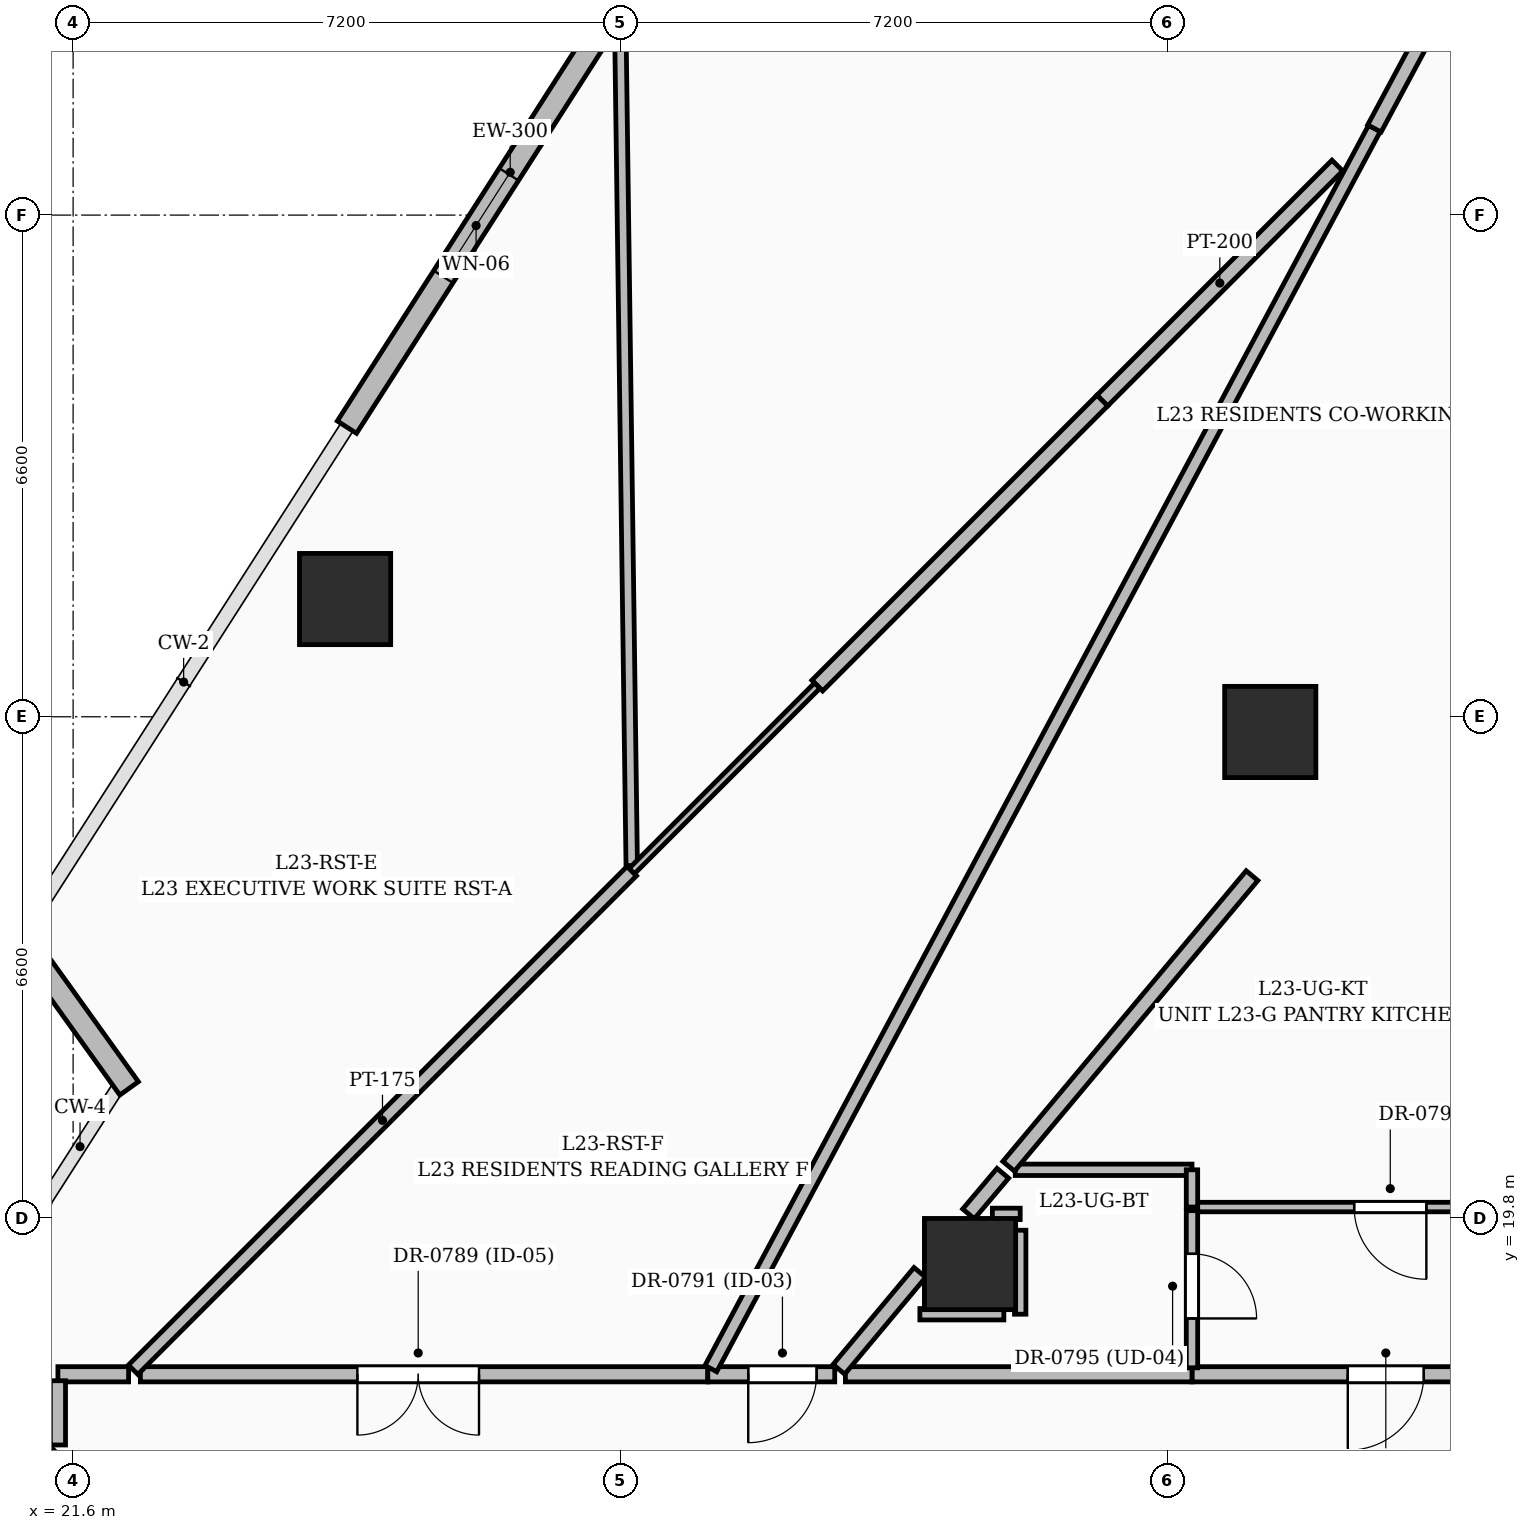
"""IFC4 building model, lengths in metres.
Left out: names, types, materials, properties, quantities, classifications, styles, units other than length and angle.
Written with IfcOpenShell. Run it as: python <this file> out.ifc"""

import sys

from ifc_helpers import new_model, si_unit, direction, frame, frame_2d, origin, origin_2d, place, context, subcontext, project, spatial, rectangle, extrude, element, fill, save


model = new_model("IFC4")
c1 = context("Model", 3, precision=1e-05, world=origin(), true_north=direction((0.0, 1.0)))
c2 = subcontext(c1, "Body", "Model", "MODEL_VIEW")
j1 = project(units=[si_unit("LENGTHUNIT", "METRE"), si_unit("PLANEANGLEUNIT", "RADIAN")], contexts=[c1])
p1 = place(None, origin())
s1 = spatial("IfcSite", under=j1, at=p1, CompositionType="ELEMENT")
p2 = place(p1, origin())
s2 = spatial("IfcBuilding", under=s1, at=p2, CompositionType="ELEMENT")
p3 = place(p2, frame((0.0, 0.0, 93.0)))
s3 = spatial("IfcBuildingStorey", under=s2, at=p3, CompositionType="ELEMENT", Elevation=93.0)
for number, where, z_axis, x_axis in (
    (1, (37.35, 26.2, 0.0), (0.0, 0.0, 1.0), (1.0, 0.0, 0.0)),
    (2, (33.4, 19.2, 0.0), (0.0, 0.0, 1.0), (1.0, 0.0, 0.0)),
    (3, (25.178, 27.949, 0.0), (0.0, 0.0, 1.0), (1.0, 0.0, 0.0)),
):
    element("IfcColumn", number, at=place(p3, frame(where, z_axis=z_axis, x_axis=x_axis)), inside=s3, PredefinedType="COLUMN", context=c2, shape_type="SweptSolid", body=[
        extrude(rectangle(XDim=1.2, YDim=1.2, at=origin_2d()), origin(), (0.0, 0.0, 1.0), 3.6),
    ])
p4 = place(p3, frame((22.337, 21.511, 0.0), z_axis=(0.0, 0.0, 1.0), x_axis=(-0.583178108206, 0.812344319922, 0.0)))
e4 = element("IfcWall", 4, at=p4, inside=s3, PredefinedType="SOLIDWALL", context=c2, shape_type="SweptSolid", body=[
    extrude(rectangle(XDim=2.593, YDim=0.3, at=frame_2d((1.296, 0.0))), origin(), (0.0, 0.0, 1.0), 2.375),
])
p5 = place(p3, frame((25.202, 30.21, 0.0), z_axis=(0.0, 0.0, 1.0), x_axis=(0.53945551692, 0.842014100395, 0.0)))
e5 = element("IfcWall", 5, at=p5, inside=s3, PredefinedType="SOLIDWALL", context=c2, shape_type="SweptSolid", body=[
    extrude(rectangle(XDim=7.964, YDim=0.3, at=frame_2d((3.982, 0.0))), origin(), (0.0, 0.0, 1.0), 3.35),
])
p6 = place(p5, frame((2.35, 0.0, 0.55)))
e6 = element("IfcOpeningElement", 6, at=p6, cuts=e5, PredefinedType="OPENING", context=c2, shape_type="SweptSolid", body=[
    extrude(rectangle(XDim=1.6, YDim=2.2, at=frame_2d((0.8, 1.1))), frame((0.0, 0.16, 0.0), z_axis=(0.0, -1.0, 0.0), x_axis=(1.0, 0.0, 0.0)), (0.0, 0.0, 1.0), 0.32),
])
p7 = place(p3, frame((22.33, 17.75, 0.0), z_axis=(0.0, 0.0, 1.0), x_axis=(-1.0, 0.0, 0.0)))
e7 = element("IfcWall", 7, at=p7, inside=s3, PredefinedType="PARTITIONING", context=c2, shape_type="SweptSolid", body=[
    extrude(rectangle(XDim=0.93, YDim=0.2, at=frame_2d((0.465, 0.0))), origin(), (0.0, 0.0, 1.0), 2.787),
])
p8 = place(p3, frame((21.4, 17.665, 0.0), z_axis=(0.0, 0.0, 1.0), x_axis=(0.0, -1.0, 0.0)))
e8 = element("IfcWall", 8, at=p8, inside=s3, PredefinedType="PARTITIONING", context=c2, shape_type="SweptSolid", body=[
    extrude(rectangle(XDim=0.845, YDim=0.2, at=frame_2d((0.422, 0.0))), origin(), (0.0, 0.0, 1.0), 2.787),
])
p9 = place(p3, frame((29.95, 17.75, 0.0), z_axis=(0.0, 0.0, 1.0), x_axis=(-1.0, 0.0, 0.0)))
e9 = element("IfcWall", 9, at=p9, inside=s3, PredefinedType="PARTITIONING", context=c2, shape_type="SweptSolid", body=[
    extrude(rectangle(XDim=7.465, YDim=0.2, at=frame_2d((3.732, 0.0))), origin(), (0.0, 0.0, 1.0), 2.345),
])
p10 = place(p9, frame((3.01, 0.0, 0.0)))
e10 = element("IfcOpeningElement", 10, at=p10, cuts=e9, PredefinedType="OPENING", context=c2, shape_type="SweptSolid", body=[
    extrude(rectangle(XDim=1.6, YDim=2.3, at=frame_2d((0.8, 1.15))), frame((0.0, 0.11, 0.0), z_axis=(0.0, -1.0, 0.0), x_axis=(1.0, 0.0, 0.0)), (0.0, 0.0, 1.0), 0.22),
])
p11 = place(p3, frame((41.42, 17.75, 0.0), z_axis=(0.0, 0.0, 1.0), x_axis=(-1.0, 0.0, 0.0)))
e11 = element("IfcWall", 11, at=p11, inside=s3, PredefinedType="PARTITIONING", context=c2, shape_type="SweptSolid", body=[
    extrude(rectangle(XDim=5.1, YDim=0.2, at=frame_2d((2.55, 0.0))), origin(), (0.0, 0.0, 1.0), 3.35),
])
p12 = place(p11, frame((2.05, 0.0, 0.0)))
e12 = element("IfcOpeningElement", 12, at=p12, cuts=e11, PredefinedType="OPENING", context=c2, shape_type="SweptSolid", body=[
    extrude(rectangle(XDim=1.0, YDim=2.2, at=frame_2d((0.5, 1.1))), frame((0.0, 0.11, 0.0), z_axis=(0.0, -1.0, 0.0), x_axis=(1.0, 0.0, 0.0)), (0.0, 0.0, 1.0), 0.22),
])
p13 = place(p3, frame((36.32, 17.75, 0.0), z_axis=(0.0, 0.0, 1.0), x_axis=(-1.0, 0.0, 0.0)))
e13 = element("IfcWall", 13, at=p13, inside=s3, PredefinedType="PARTITIONING", context=c2, shape_type="SweptSolid", body=[
    extrude(rectangle(XDim=4.56, YDim=0.2, at=frame_2d((2.28, 0.0))), origin(), (0.0, 0.0, 1.0), 2.309),
])
p14 = place(p3, frame((31.62, 17.75, 0.0), z_axis=(0.0, 0.0, 1.0), x_axis=(-1.0, 0.0, 0.0)))
e14 = element("IfcWall", 14, at=p14, inside=s3, PredefinedType="PARTITIONING", context=c2, shape_type="SweptSolid", body=[
    extrude(rectangle(XDim=1.67, YDim=0.2, at=frame_2d((0.835, 0.0))), origin(), (0.0, 0.0, 1.0), 3.35),
])
p15 = place(p14, frame((0.238, 0.0, 0.0)))
e15 = element("IfcOpeningElement", 15, at=p15, cuts=e14, PredefinedType="OPENING", context=c2, shape_type="SweptSolid", body=[
    extrude(rectangle(XDim=0.9, YDim=2.1, at=frame_2d((0.45, 1.05))), frame((0.0, 0.11, 0.0), z_axis=(0.0, -1.0, 0.0), x_axis=(1.0, 0.0, 0.0)), (0.0, 0.0, 1.0), 0.22),
])
p16 = place(p3, frame((21.34, 16.76, 0.0), z_axis=(0.0, 0.0, 1.0), x_axis=(-0.70674642835, -0.707466950475, 0.0)))
e16 = element("IfcWall", 16, at=p16, inside=s3, PredefinedType="PARTITIONING", context=c2, shape_type="SweptSolid", body=[
    extrude(rectangle(XDim=14.231, YDim=0.175, at=frame_2d((7.116, 0.0))), origin(), (0.0, 0.0, 1.0), 2.345),
])
p17 = place(p16, frame((6.648, 0.0, 0.0)))
e17 = element("IfcOpeningElement", 17, at=p17, cuts=e16, PredefinedType="OPENING", context=c2, shape_type="SweptSolid", body=[
    extrude(rectangle(XDim=0.95, YDim=2.2, at=frame_2d((0.475, 1.1))), frame((0.0, 0.097, 0.0), z_axis=(0.0, -1.0, 0.0), x_axis=(1.0, 0.0, 0.0)), (0.0, 0.0, 1.0), 0.195),
])
p18 = place(p3, frame((22.39, 17.81, 0.0), z_axis=(0.0, 0.0, 1.0), x_axis=(0.707093622896, 0.707119939232, 0.0)))
e18 = element("IfcWall", 18, at=p18, inside=s3, PredefinedType="PARTITIONING", context=c2, shape_type="SweptSolid", body=[
    extrude(rectangle(XDim=9.277, YDim=0.175, at=frame_2d((4.639, 0.0))), origin(), (0.0, 0.0, 1.0), 2.345),
])
p19 = place(p3, frame((28.949, 24.442, 0.0), z_axis=(0.0, 0.0, 1.0), x_axis=(-0.013598057178, 0.999907542146, 0.0)))
e19 = element("IfcWall", 19, at=p19, inside=s3, PredefinedType="PARTITIONING", context=c2, shape_type="SweptSolid", body=[
    extrude(rectangle(XDim=11.114, YDim=0.15, at=frame_2d((5.557, 0.0))), origin(), (0.0, 0.0, 1.0), 2.37),
])
p20 = place(p3, frame((29.99, 17.825, 0.0), z_axis=(0.0, 0.0, 1.0), x_axis=(0.471794438595, 0.881708573005, 0.0)))
e20 = element("IfcWall", 20, at=p20, inside=s3, PredefinedType="PARTITIONING", context=c2, shape_type="SweptSolid", body=[
    extrude(rectangle(XDim=18.504, YDim=0.175, at=frame_2d((9.252, 0.0))), origin(), (0.0, 0.0, 1.0), 2.345),
])
p21 = place(p3, frame((38.232, 33.652, 0.0), z_axis=(0.0, 0.0, 1.0), x_axis=(-0.707134695316, -0.707078865955, 0.0)))
e21 = element("IfcWall", 21, at=p21, inside=s3, PredefinedType="PARTITIONING", context=c2, shape_type="SweptSolid", body=[
    extrude(rectangle(XDim=4.373, YDim=0.2, at=frame_2d((2.187, 0.0))), origin(), (0.0, 0.0, 1.0), 2.787),
])
p22 = place(p3, frame((35.14, 30.56, 0.0), z_axis=(0.0, 0.0, 1.0), x_axis=(-0.707106781187, -0.707106781187, 0.0)))
e22 = element("IfcWall", 22, at=p22, inside=s3, PredefinedType="PARTITIONING", context=c2, shape_type="SweptSolid", body=[
    extrude(rectangle(XDim=5.303, YDim=0.2, at=frame_2d((2.652, 0.0))), origin(), (0.0, 0.0, 1.0), 2.345),
])
p23 = place(p3, frame((41.42, 19.95, 0.0), z_axis=(0.0, 0.0, 1.0), x_axis=(-1.0, 0.0, 0.0)))
e23 = element("IfcWall", 23, at=p23, inside=s3, PredefinedType="PARTITIONING", context=c2, shape_type="SweptSolid", body=[
    extrude(rectangle(XDim=5.1, YDim=0.125, at=frame_2d((2.55, 0.0))), origin(), (0.0, 0.0, 1.0), 3.35),
])
p24 = place(p23, frame((2.016, 0.0, 0.0)))
e24 = element("IfcOpeningElement", 24, at=p24, cuts=e23, PredefinedType="OPENING", context=c2, shape_type="SweptSolid", body=[
    extrude(rectangle(XDim=0.95, YDim=2.2, at=frame_2d((0.475, 1.1))), frame((0.0, 0.072, 0.0), z_axis=(0.0, -1.0, 0.0), x_axis=(1.0, 0.0, 0.0)), (0.0, 0.0, 1.0), 0.145),
])
p25 = place(p3, frame((36.32, 19.903, 0.0), z_axis=(0.0, 0.0, 1.0), x_axis=(0.0, -1.0, 0.0)))
e25 = element("IfcWall", 25, at=p25, inside=s3, PredefinedType="PARTITIONING", context=c2, shape_type="SweptSolid", body=[
    extrude(rectangle(XDim=2.068, YDim=0.15, at=frame_2d((1.034, 0.0))), origin(), (0.0, 0.0, 1.0), 3.35),
])
p26 = place(p25, frame((0.568, 0.0, 0.0)))
e26 = element("IfcOpeningElement", 26, at=p26, cuts=e25, PredefinedType="OPENING", context=c2, shape_type="SweptSolid", body=[
    extrude(rectangle(XDim=0.85, YDim=2.1, at=frame_2d((0.425, 1.05))), frame((0.0, 0.085, 0.0), z_axis=(0.0, -1.0, 0.0), x_axis=(1.0, 0.0, 0.0)), (0.0, 0.0, 1.0), 0.17),
])
p27 = place(p3, frame((33.995, 20.44, 0.0), z_axis=(0.0, 0.0, 1.0), x_axis=(1.0, 0.0, 0.0)))
e27 = element("IfcWall", 27, at=p27, inside=s3, PredefinedType="PARTITIONING", context=c2, shape_type="SweptSolid", body=[
    extrude(rectangle(XDim=2.325, YDim=0.15, at=frame_2d((1.163, 0.0))), origin(), (0.0, 0.0, 1.0), 2.309),
])
p28 = place(p3, frame((36.32, 20.44, 0.0), z_axis=(0.0, 0.0, 1.0), x_axis=(0.0, -1.0, 0.0)))
e28 = element("IfcWall", 28, at=p28, inside=s3, PredefinedType="PARTITIONING", context=c2, shape_type="SweptSolid", body=[
    extrude(rectangle(XDim=0.49, YDim=0.15, at=frame_2d((0.245, 0.0))), origin(), (0.0, 0.0, 1.0), 3.35),
])
p29 = place(p3, frame((37.11, 24.31, 0.0), z_axis=(0.0, 0.0, 1.0), x_axis=(-0.641959412344, -0.766738620981, 0.0)))
e29 = element("IfcWall", 29, at=p29, inside=s3, PredefinedType="PARTITIONING", context=c2, shape_type="SweptSolid", body=[
    extrude(rectangle(XDim=4.987, YDim=0.2, at=frame_2d((2.494, 0.0))), origin(), (0.0, 0.0, 1.0), 2.309),
])
p30 = place(p3, frame((32.74, 19.09, 0.0), z_axis=(0.0, 0.0, 1.0), x_axis=(-0.641253321663, -0.767329249707, 0.0)))
e30 = element("IfcWall", 30, at=p30, inside=s3, PredefinedType="PARTITIONING", context=c2, shape_type="SweptSolid", body=[
    extrude(rectangle(XDim=1.661, YDim=0.2, at=frame_2d((0.831, 0.0))), origin(), (0.0, 0.0, 1.0), 3.35),
])
p31 = place(p3, frame((33.831, 20.394, 0.0), z_axis=(0.0, 0.0, 1.0), x_axis=(-0.645457004141, -0.763796606306, 0.0)))
e31 = element("IfcWall", 31, at=p31, inside=s3, PredefinedType="PARTITIONING", context=c2, shape_type="SweptSolid", body=[
    extrude(rectangle(XDim=0.699, YDim=0.2, at=frame_2d((0.35, 0.0))), origin(), (0.0, 0.0, 1.0), 2.309),
])
p32 = place(p3, frame((39.68, 35.93, 0.0), z_axis=(0.0, 0.0, 1.0), x_axis=(-0.472608279445, -0.881272610603, 0.0)))
e32 = element("IfcWall", 32, at=p32, inside=s3, PredefinedType="PARTITIONING", context=c2, shape_type="SweptSolid", body=[
    extrude(rectangle(XDim=2.031, YDim=0.2, at=frame_2d((1.016, 0.0))), origin(), (0.0, 0.0, 1.0), 3.35),
])
p33 = place(p3, frame((31.39, 26.81, 0.0), z_axis=(0.0, 0.0, 1.0), x_axis=(-0.707106781187, -0.707106781187, 0.0)))
e33 = element("IfcWall", 33, at=p33, inside=s3, PredefinedType="PARTITIONING", context=c2, shape_type="SweptSolid", body=[
    extrude(rectangle(XDim=3.451, YDim=0.1, at=frame_2d((1.725, 0.0))), origin(), (0.0, 0.0, 1.0), 2.345),
])
p34 = place(p3, frame((33.694, 19.86, 0.0), z_axis=(0.0, 0.0, 1.0), x_axis=(1.0, 0.0, 0.0)))
e34 = element("IfcWall", 34, at=p34, inside=s3, PredefinedType="PARTITIONING", context=c2, shape_type="SweptSolid", body=[
    extrude(rectangle(XDim=0.366, YDim=0.15, at=frame_2d((0.183, 0.0))), origin(), (0.0, 0.0, 1.0), 2.309),
])
p35 = place(p3, frame((34.06, 19.645, 0.0), z_axis=(0.0, 0.0, 1.0), x_axis=(0.0, -1.0, 0.0)))
e35 = element("IfcWall", 35, at=p35, inside=s3, PredefinedType="PARTITIONING", context=c2, shape_type="SweptSolid", body=[
    extrude(rectangle(XDim=1.105, YDim=0.15, at=frame_2d((0.552, 0.0))), origin(), (0.0, 0.0, 1.0), 3.35),
])
p36 = place(p3, frame((33.845, 18.54, 0.0), z_axis=(0.0, 0.0, 1.0), x_axis=(-1.0, 0.0, 0.0)))
e36 = element("IfcWall", 36, at=p36, inside=s3, PredefinedType="PARTITIONING", context=c2, shape_type="SweptSolid", body=[
    extrude(rectangle(XDim=1.105, YDim=0.15, at=frame_2d((0.552, 0.0))), origin(), (0.0, 0.0, 1.0), 2.309),
])
p37 = place(p6, origin())
e37 = element("IfcWindow", 37, at=p37, inside=s3, PartitioningType="SINGLE_PANEL", PredefinedType="WINDOW", context=c2, shape_type="SweptSolid", body=[
    extrude(rectangle(XDim=1.6, YDim=2.2, at=frame_2d((0.8, 1.1))), frame((0.0, 0.03, 0.0), z_axis=(0.0, -1.0, 0.0), x_axis=(1.0, 0.0, 0.0)), (0.0, 0.0, 1.0), 0.06),
])
fill(e6, e37)
p38 = place(p10, origin())
e38 = element("IfcDoor", 38, at=p38, inside=s3, OperationType="DOUBLE_DOOR_SINGLE_SWING", PredefinedType="DOOR", context=c2, shape_type="SweptSolid", body=[
    extrude(rectangle(XDim=1.6, YDim=2.3, at=frame_2d((0.8, 1.15))), frame((0.0, 0.025, 0.0), z_axis=(0.0, -1.0, 0.0), x_axis=(1.0, 0.0, 0.0)), (0.0, 0.0, 1.0), 0.05),
])
fill(e10, e38)
p39 = place(p15, origin())
e39 = element("IfcDoor", 39, at=p39, inside=s3, OperationType="SINGLE_SWING_RIGHT", PredefinedType="DOOR", context=c2, shape_type="SweptSolid", body=[
    extrude(rectangle(XDim=0.9, YDim=2.1, at=frame_2d((0.45, 1.05))), frame((0.0, 0.025, 0.0), z_axis=(0.0, -1.0, 0.0), x_axis=(1.0, 0.0, 0.0)), (0.0, 0.0, 1.0), 0.05),
])
fill(e15, e39)
p40 = place(p12, origin())
e40 = element("IfcDoor", 40, at=p40, inside=s3, OperationType="SINGLE_SWING_RIGHT", PredefinedType="DOOR", context=c2, shape_type="SweptSolid", body=[
    extrude(rectangle(XDim=1.0, YDim=2.2, at=frame_2d((0.5, 1.1))), frame((0.0, 0.025, 0.0), z_axis=(0.0, -1.0, 0.0), x_axis=(1.0, 0.0, 0.0)), (0.0, 0.0, 1.0), 0.05),
])
fill(e12, e40)
p41 = place(p24, origin())
e41 = element("IfcDoor", 41, at=p41, inside=s3, OperationType="SINGLE_SWING_LEFT", PredefinedType="DOOR", context=c2, shape_type="SweptSolid", body=[
    extrude(rectangle(XDim=0.95, YDim=2.2, at=frame_2d((0.475, 1.1))), frame((0.0, 0.025, 0.0), z_axis=(0.0, -1.0, 0.0), x_axis=(1.0, 0.0, 0.0)), (0.0, 0.0, 1.0), 0.05),
])
fill(e24, e41)
p42 = place(p26, origin())
e42 = element("IfcDoor", 42, at=p42, inside=s3, OperationType="SINGLE_SWING_RIGHT", PredefinedType="DOOR", context=c2, shape_type="SweptSolid", body=[
    extrude(rectangle(XDim=0.85, YDim=2.1, at=frame_2d((0.425, 1.05))), frame((0.0, 0.025, 0.0), z_axis=(0.0, -1.0, 0.0), x_axis=(1.0, 0.0, 0.0)), (0.0, 0.0, 1.0), 0.05),
])
fill(e26, e42)
save(model, sys.argv[1])
